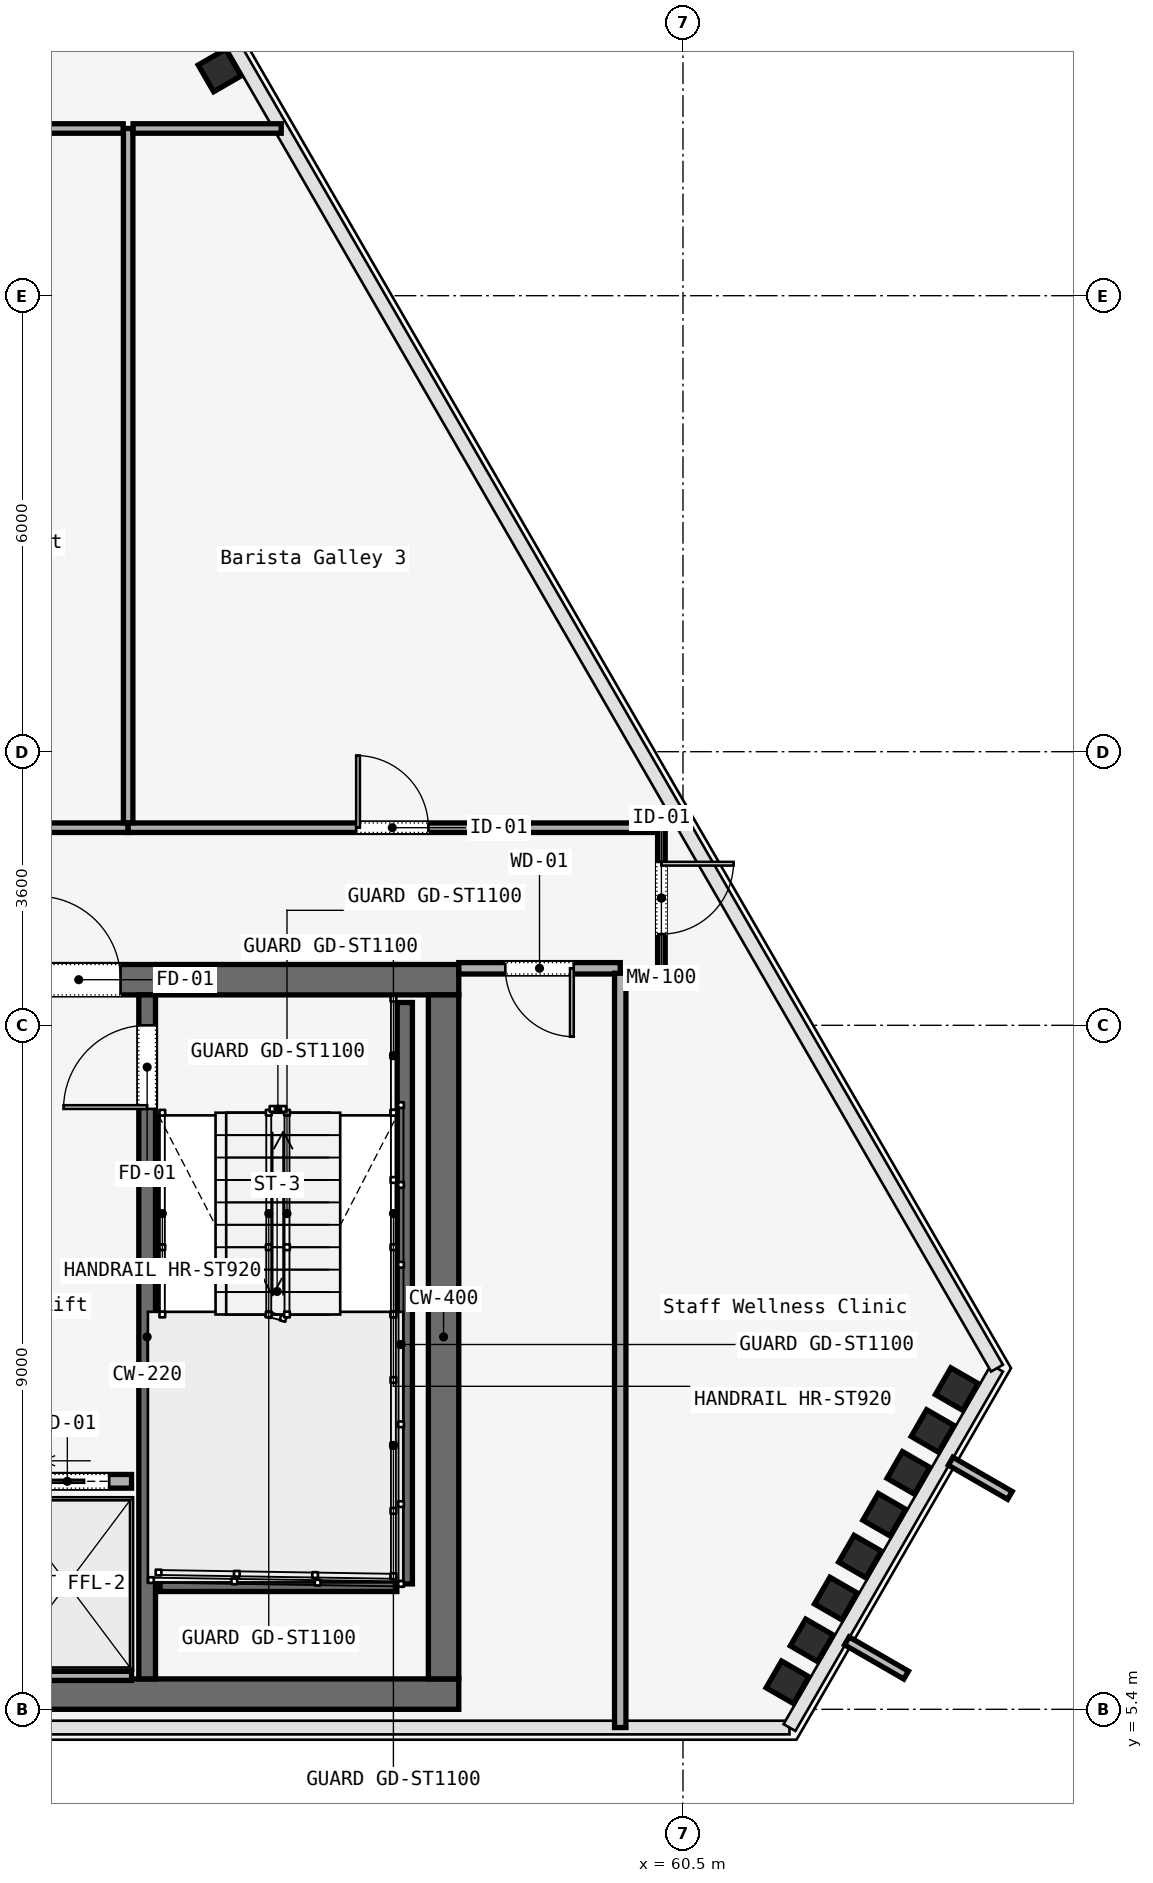
"""IFC4 building model, lengths in metres.
Left out: names, types, materials, properties, quantities, classifications, styles, units other than length and angle.
Written with IfcOpenShell. Run it as: python <this file> out.ifc"""

import sys

from ifc_helpers import new_model, si_unit, direction, frame, frame_2d, origin, origin_2d, place, context, subcontext, project, spatial, rectangle, i_section, extrude, element, fill, save


model = new_model("IFC4")
c1 = context("Model", 3, precision=1e-05, world=origin(), true_north=direction((0.0, 1.0)))
c2 = subcontext(c1, "Body", "Model", "MODEL_VIEW")
j1 = project(units=[si_unit("LENGTHUNIT", "METRE"), si_unit("PLANEANGLEUNIT", "RADIAN")], contexts=[c1])
p1 = place(None, origin())
s1 = spatial("IfcSite", under=j1, at=p1, CompositionType="ELEMENT")
p2 = place(p1, origin())
s2 = spatial("IfcBuilding", under=s1, at=p2, CompositionType="ELEMENT")
p3 = place(p2, frame((0.0, 0.0, 263.6)))
s3 = spatial("IfcBuildingStorey", under=s2, at=p3, CompositionType="ELEMENT", Elevation=263.6)
p4 = place(p3, frame((26.45, 15.0, 0.0), z_axis=(0.0, 0.0, 1.0), x_axis=(1.0, 0.0, 0.0)))
e1 = element("IfcWall", 1, at=p4, inside=s3, PredefinedType="SOLIDWALL", context=c2, shape_type="SweptSolid", body=[
    extrude(rectangle(XDim=31.1, YDim=0.4, at=frame_2d((15.55, 0.0))), origin(), (0.0, 0.0, 1.0), 3.58),
])
p5 = place(p4, frame((1.65, 0.0, 0.0)))
e2 = element("IfcOpeningElement", 2, at=p5, cuts=e1, PredefinedType="OPENING", context=c2, shape_type="SweptSolid", body=[
    extrude(rectangle(XDim=1.1, YDim=2.2, at=frame_2d((0.55, 1.1))), frame((0.0, 0.2, 0.0), z_axis=(0.0, -1.0, 0.0), x_axis=(1.0, 0.0, 0.0)), (0.0, 0.0, 1.0), 0.4),
])
p6 = place(p4, frame((13.65, 0.0, 0.0)))
e3 = element("IfcOpeningElement", 3, at=p6, cuts=e1, PredefinedType="OPENING", context=c2, shape_type="SweptSolid", body=[
    extrude(rectangle(XDim=1.1, YDim=2.2, at=frame_2d((0.55, 1.1))), frame((0.0, 0.2, 0.0), z_axis=(0.0, -1.0, 0.0), x_axis=(1.0, 0.0, 0.0)), (0.0, 0.0, 1.0), 0.4),
])
p7 = place(p4, frame((25.55, 0.0, 0.0)))
e4 = element("IfcOpeningElement", 4, at=p7, cuts=e1, PredefinedType="OPENING", context=c2, shape_type="SweptSolid", body=[
    extrude(rectangle(XDim=1.1, YDim=2.2, at=frame_2d((0.55, 1.1))), frame((0.0, 0.2, 0.0), z_axis=(0.0, -1.0, 0.0), x_axis=(1.0, 0.0, 0.0)), (0.0, 0.0, 1.0), 0.4),
])
p8 = place(p4, frame((19.35, 0.0, 0.0)))
e5 = element("IfcOpeningElement", 5, at=p8, cuts=e1, PredefinedType="OPENING", context=c2, shape_type="SweptSolid", body=[
    extrude(rectangle(XDim=1.1, YDim=2.2, at=frame_2d((0.55, 1.1))), frame((0.0, 0.2, 0.0), z_axis=(0.0, -1.0, 0.0), x_axis=(1.0, 0.0, 0.0)), (0.0, 0.0, 1.0), 0.4),
])
p9 = place(p4, frame((21.4, 0.0, 0.0)))
e6 = element("IfcOpeningElement", 6, at=p9, cuts=e1, PredefinedType="OPENING", context=c2, shape_type="SweptSolid", body=[
    extrude(rectangle(XDim=0.9, YDim=2.1, at=frame_2d((0.45, 1.05))), frame((0.0, 0.2, 0.0), z_axis=(0.0, -1.0, 0.0), x_axis=(1.0, 0.0, 0.0)), (0.0, 0.0, 1.0), 0.4),
])
p10 = place(p4, frame((5.14, 0.0, 0.0)))
e7 = element("IfcOpeningElement", 7, at=p10, cuts=e1, PredefinedType="OPENING", context=c2, shape_type="SweptSolid", body=[
    extrude(rectangle(XDim=0.95, YDim=2.2, at=frame_2d((0.475, 1.1))), frame((0.0, 0.2, 0.0), z_axis=(0.0, -1.0, 0.0), x_axis=(1.0, 0.0, 0.0)), (0.0, 0.0, 1.0), 0.4),
])
p11 = place(p4, frame((7.825, 0.0, 0.0)))
e8 = element("IfcOpeningElement", 8, at=p11, cuts=e1, PredefinedType="OPENING", context=c2, shape_type="SweptSolid", body=[
    extrude(rectangle(XDim=0.95, YDim=2.2, at=frame_2d((0.475, 1.1))), frame((0.0, 0.2, 0.0), z_axis=(0.0, -1.0, 0.0), x_axis=(1.0, 0.0, 0.0)), (0.0, 0.0, 1.0), 0.4),
])
p12 = place(p4, frame((10.46, 0.0, 0.0)))
e9 = element("IfcOpeningElement", 9, at=p12, cuts=e1, PredefinedType="OPENING", context=c2, shape_type="SweptSolid", body=[
    extrude(rectangle(XDim=0.95, YDim=2.2, at=frame_2d((0.475, 1.1))), frame((0.0, 0.2, 0.0), z_axis=(0.0, -1.0, 0.0), x_axis=(1.0, 0.0, 0.0)), (0.0, 0.0, 1.0), 0.4),
])
p13 = place(p4, frame((23.35, 0.0, 0.0)))
e10 = element("IfcOpeningElement", 10, at=p13, cuts=e1, PredefinedType="OPENING", context=c2, shape_type="SweptSolid", body=[
    extrude(rectangle(XDim=1.3, YDim=2.3, at=frame_2d((0.65, 1.15))), frame((0.0, 0.2, 0.0), z_axis=(0.0, -1.0, 0.0), x_axis=(1.0, 0.0, 0.0)), (0.0, 0.0, 1.0), 0.4),
])
p14 = place(p3, frame((26.45, 5.6, 0.0), z_axis=(0.0, 0.0, 1.0), x_axis=(1.0, 0.0, 0.0)))
e11 = element("IfcWall", 11, at=p14, inside=s3, PredefinedType="SOLIDWALL", context=c2, shape_type="SweptSolid", body=[
    extrude(rectangle(XDim=31.1, YDim=0.4, at=frame_2d((15.55, 0.0))), origin(), (0.0, 0.0, 1.0), 3.58),
])
p15 = place(p3, frame((57.35, 5.8, 0.0), z_axis=(0.0, 0.0, 1.0), x_axis=(0.0, 1.0, 0.0)))
e12 = element("IfcWall", 12, at=p15, inside=s3, PredefinedType="SOLIDWALL", context=c2, shape_type="SweptSolid", body=[
    extrude(rectangle(XDim=9.0, YDim=0.4, at=frame_2d((4.5, 0.0))), origin(), (0.0, 0.0, 1.0), 3.58),
])
p16 = place(p3, frame((53.45, 5.8, 0.0), z_axis=(0.0, 0.0, 1.0), x_axis=(0.0, 1.0, 0.0)))
e13 = element("IfcWall", 13, at=p16, inside=s3, PredefinedType="SOLIDWALL", context=c2, shape_type="SweptSolid", body=[
    extrude(rectangle(XDim=9.0, YDim=0.22, at=frame_2d((4.5, 0.0))), origin(), (0.0, 0.0, 1.0), 3.58),
])
p17 = place(p16, frame((7.5, 0.0, 0.0)))
e14 = element("IfcOpeningElement", 14, at=p17, cuts=e13, PredefinedType="OPENING", context=c2, shape_type="SweptSolid", body=[
    extrude(rectangle(XDim=1.1, YDim=2.2, at=frame_2d((0.55, 1.1))), frame((0.0, 0.11, 0.0), z_axis=(0.0, -1.0, 0.0), x_axis=(1.0, 0.0, 0.0)), (0.0, 0.0, 1.0), 0.22),
])
for number, where, z_axis, x_axis in (
    (15, (61.875, 5.756, 0.0), (0.0, 0.0, 1.0), (0.5, 0.866, 0.0)),
    (16, (62.194, 6.307, 0.0), (0.0, 0.0, 1.0), (0.5, 0.866, 0.0)),
    (17, (62.512, 6.858, 0.0), (0.0, 0.0, 1.0), (0.5, 0.866, 0.0)),
    (18, (62.83, 7.409, 0.0), (0.0, 0.0, 1.0), (0.5, 0.866, 0.0)),
    (19, (63.148, 7.96, 0.0), (0.0, 0.0, 1.0), (0.5, 0.866, 0.0)),
    (20, (63.466, 8.511, 0.0), (0.0, 0.0, 1.0), (0.5, 0.866, 0.0)),
    (21, (63.784, 9.062, 0.0), (0.0, 0.0, 1.0), (0.5, 0.866, 0.0)),
    (22, (64.103, 9.613, 0.0), (0.0, 0.0, 1.0), (0.5, 0.866, 0.0)),
    (23, (54.404, 26.964, 0.0), (0.0, 0.0, 1.0), (-0.5, 0.866, 0.0)),
):
    element("IfcColumn", number, at=place(p3, frame(where, z_axis=z_axis, x_axis=x_axis)), inside=s3, PredefinedType="COLUMN", context=c2, shape_type="SweptSolid", body=[
        extrude(i_section(OverallWidth=0.406, OverallDepth=0.416, WebThickness=0.03, FlangeThickness=0.037, FilletRadius=0.015, at=origin_2d()), origin(), (0.0, 0.0, 1.0), 3.58),
    ])
p18 = place(p3, frame((56.84, 14.7, 0.0), z_axis=(0.0, 0.0, 1.0), x_axis=(0.0, -1.0, 0.0)))
e24 = element("IfcWall", 24, at=p18, inside=s3, PredefinedType="SOLIDWALL", context=c2, shape_type="SweptSolid", body=[
    extrude(rectangle(XDim=7.65, YDim=0.2, at=frame_2d((3.825, 0.0))), origin(), (0.0, 0.0, 1.0), 3.8),
])
p19 = place(p3, frame((53.62, 7.05, 0.0), z_axis=(0.0, 0.0, 1.0), x_axis=(1.0, 0.0, 0.0)))
e25 = element("IfcWall", 25, at=p19, inside=s3, PredefinedType="SOLIDWALL", context=c2, shape_type="SweptSolid", body=[
    extrude(rectangle(XDim=3.115, YDim=0.2, at=frame_2d((1.558, 0.0))), origin(), (0.0, 0.0, 1.0), 3.8),
])
p20 = place(p3, frame((51.555, 8.4, 0.0), z_axis=(0.0, 0.0, 1.0), x_axis=(1.0, 0.0, 0.0)))
e26 = element("IfcWall", 26, at=p20, inside=s3, PredefinedType="SOLIDWALL", context=c2, shape_type="SweptSolid", body=[
    extrude(rectangle(XDim=1.69, YDim=0.18, at=frame_2d((0.845, 0.0))), origin(), (0.0, 0.0, 1.0), 3.01),
])
p21 = place(p20, frame((0.295, 0.0, 0.0)))
e27 = element("IfcOpeningElement", 27, at=p21, cuts=e26, PredefinedType="OPENING", context=c2, shape_type="SweptSolid", body=[
    extrude(rectangle(XDim=1.1, YDim=2.2, at=frame_2d((0.55, 1.1))), frame((0.0, 0.09, 0.0), z_axis=(0.0, -1.0, 0.0), x_axis=(1.0, 0.0, 0.0)), (0.0, 0.0, 1.0), 0.18),
])
p22 = place(p3, frame((51.555, 5.84, 0.0), z_axis=(0.0, 0.0, 1.0), x_axis=(1.0, 0.0, 0.0)))
e28 = element("IfcWall", 28, at=p22, inside=s3, PredefinedType="SOLIDWALL", context=c2, shape_type="SweptSolid", body=[
    extrude(rectangle(XDim=1.69, YDim=0.12, at=frame_2d((0.845, 0.0))), origin(), (0.0, 0.0, 1.0), 3.01),
])
p23 = place(p3, frame((60.216, 17.0, 0.0), z_axis=(0.0, 0.0, 1.0), x_axis=(0.0, -1.0, 0.0)))
e29 = element("IfcWall", 29, at=p23, inside=s3, PredefinedType="MOVABLE", context=c2, shape_type="SweptSolid", body=[
    extrude(rectangle(XDim=1.85, YDim=0.1, at=frame_2d((0.925, 0.0))), origin(), (0.0, 0.0, 1.0), 3.01),
])
p24 = place(p23, frame((0.45, 0.0, 0.0)))
e30 = element("IfcOpeningElement", 30, at=p24, cuts=e29, PredefinedType="OPENING", context=c2, shape_type="SweptSolid", body=[
    extrude(rectangle(XDim=0.95, YDim=2.2, at=frame_2d((0.475, 1.1))), frame((0.0, 0.05, 0.0), z_axis=(0.0, -1.0, 0.0), x_axis=(1.0, 0.0, 0.0)), (0.0, 0.0, 1.0), 0.1),
])
p25 = place(p3, frame((59.674, 15.15, 0.0), z_axis=(0.0, 0.0, 1.0), x_axis=(-1.0, 0.0, 0.0)))
e31 = element("IfcWall", 31, at=p25, inside=s3, PredefinedType="PARTITIONING", context=c2, shape_type="SweptSolid", body=[
    extrude(rectangle(XDim=2.124, YDim=0.15, at=frame_2d((1.062, 0.0))), origin(), (0.0, 0.0, 1.0), 3.01),
])
p26 = place(p25, frame((0.612, 0.0, 0.0)))
e32 = element("IfcOpeningElement", 32, at=p26, cuts=e31, PredefinedType="OPENING", context=c2, shape_type="SweptSolid", body=[
    extrude(rectangle(XDim=0.9, YDim=2.15, at=frame_2d((0.45, 1.075))), frame((0.0, 0.075, 0.0), z_axis=(0.0, -1.0, 0.0), x_axis=(1.0, 0.0, 0.0)), (0.0, 0.0, 1.0), 0.15),
])
p27 = place(p3, frame((48.4, 17.0, 0.0), z_axis=(0.0, 0.0, 1.0), x_axis=(1.0, 0.0, 0.0)))
e33 = element("IfcWall", 33, at=p27, inside=s3, PredefinedType="PARTITIONING", context=c2, shape_type="SweptSolid", body=[
    extrude(rectangle(XDim=4.8, YDim=0.125, at=frame_2d((2.4, 0.0))), origin(), (0.0, 0.0, 1.0), 3.01),
])
p28 = place(p27, frame((1.925, 0.0, 0.0)))
e34 = element("IfcOpeningElement", 34, at=p28, cuts=e33, PredefinedType="OPENING", context=c2, shape_type="SweptSolid", body=[
    extrude(rectangle(XDim=0.95, YDim=2.2, at=frame_2d((0.475, 1.1))), frame((0.0, 0.062, 0.0), z_axis=(0.0, -1.0, 0.0), x_axis=(1.0, 0.0, 0.0)), (0.0, 0.0, 1.0), 0.125),
])
p29 = place(p3, frame((53.2, 17.0, 0.0), z_axis=(0.0, 0.0, 1.0), x_axis=(1.0, 0.0, 0.0)))
e35 = element("IfcWall", 35, at=p29, inside=s3, PredefinedType="PARTITIONING", context=c2, shape_type="SweptSolid", body=[
    extrude(rectangle(XDim=6.951, YDim=0.125, at=frame_2d((3.476, 0.0))), origin(), (0.0, 0.0, 1.0), 3.01),
])
p30 = place(p29, frame((3.0, 0.0, 0.0)))
e36 = element("IfcOpeningElement", 36, at=p30, cuts=e35, PredefinedType="OPENING", context=c2, shape_type="SweptSolid", body=[
    extrude(rectangle(XDim=0.95, YDim=2.2, at=frame_2d((0.475, 1.1))), frame((0.0, 0.062, 0.0), z_axis=(0.0, -1.0, 0.0), x_axis=(1.0, 0.0, 0.0)), (0.0, 0.0, 1.0), 0.125),
])
p31 = place(p3, frame((59.674, 15.085, 0.0), z_axis=(0.0, 0.0, 1.0), x_axis=(0.0, -1.0, 0.0)))
e37 = element("IfcWall", 37, at=p31, inside=s3, PredefinedType="PARTITIONING", context=c2, shape_type="SweptSolid", body=[
    extrude(rectangle(XDim=9.925, YDim=0.15, at=frame_2d((4.962, 0.0))), origin(), (0.0, 0.0, 1.0), 3.01),
])
p32 = place(p3, frame((53.2, 17.065, 0.0), z_axis=(0.0, 0.0, 1.0), x_axis=(0.0, 1.0, 0.0)))
e38 = element("IfcWall", 38, at=p32, inside=s3, PredefinedType="PARTITIONING", context=c2, shape_type="SweptSolid", body=[
    extrude(rectangle(XDim=9.135, YDim=0.125, at=frame_2d((4.567, 0.0))), origin(), (0.0, 0.0, 1.0), 3.01),
])
p33 = place(p3, frame((53.265, 26.2, 0.0), z_axis=(0.0, 0.0, 1.0), x_axis=(1.0, 0.0, 0.0)))
e39 = element("IfcWall", 39, at=p33, inside=s3, PredefinedType="PARTITIONING", context=c2, shape_type="SweptSolid", body=[
    extrude(rectangle(XDim=1.949, YDim=0.125, at=frame_2d((0.975, 0.0))), origin(), (0.0, 0.0, 1.0), 3.01),
])
p34 = place(p3, frame((48.5, 26.2, 0.0), z_axis=(0.0, 0.0, 1.0), x_axis=(1.0, 0.0, 0.0)))
e40 = element("IfcWall", 40, at=p34, inside=s3, PredefinedType="PARTITIONING", context=c2, shape_type="SweptSolid", body=[
    extrude(rectangle(XDim=4.635, YDim=0.125, at=frame_2d((2.317, 0.0))), origin(), (0.0, 0.0, 1.0), 3.01),
])
p35 = place(p7, origin())
e41 = element("IfcDoor", 41, at=p35, inside=s3, OperationType="SINGLE_SWING_RIGHT", PredefinedType="DOOR", context=c2, shape_type="SweptSolid", body=[
    extrude(rectangle(XDim=1.1, YDim=2.2, at=frame_2d((0.55, 1.1))), frame((0.0, 0.025, 0.0), z_axis=(0.0, -1.0, 0.0), x_axis=(1.0, 0.0, 0.0)), (0.0, 0.0, 1.0), 0.05),
])
fill(e4, e41)
p36 = place(p17, origin())
e42 = element("IfcDoor", 42, at=p36, inside=s3, OperationType="SINGLE_SWING_LEFT", PredefinedType="DOOR", context=c2, shape_type="SweptSolid", body=[
    extrude(rectangle(XDim=1.1, YDim=2.2, at=frame_2d((0.55, 1.1))), frame((0.0, 0.025, 0.0), z_axis=(0.0, -1.0, 0.0), x_axis=(1.0, 0.0, 0.0)), (0.0, 0.0, 1.0), 0.05),
])
fill(e14, e42)
p37 = place(p21, origin())
e43 = element("IfcDoor", 43, at=p37, inside=s3, OperationType="SLIDING_TO_LEFT", PredefinedType="DOOR", context=c2, shape_type="SweptSolid", body=[
    extrude(rectangle(XDim=1.1, YDim=2.2, at=frame_2d((0.55, 1.1))), frame((0.0, 0.025, 0.0), z_axis=(0.0, -1.0, 0.0), x_axis=(1.0, 0.0, 0.0)), (0.0, 0.0, 1.0), 0.05),
])
fill(e27, e43)
p38 = place(p26, origin())
e44 = element("IfcDoor", 44, at=p38, inside=s3, OperationType="SINGLE_SWING_LEFT", PredefinedType="DOOR", context=c2, shape_type="SweptSolid", body=[
    extrude(rectangle(XDim=0.9, YDim=2.15, at=frame_2d((0.45, 1.075))), frame((0.0, 0.025, 0.0), z_axis=(0.0, -1.0, 0.0), x_axis=(1.0, 0.0, 0.0)), (0.0, 0.0, 1.0), 0.05),
])
fill(e32, e44)
p39 = place(p24, origin())
e45 = element("IfcDoor", 45, at=p39, inside=s3, OperationType="SINGLE_SWING_LEFT", PredefinedType="DOOR", context=c2, shape_type="SweptSolid", body=[
    extrude(rectangle(XDim=0.95, YDim=2.2, at=frame_2d((0.475, 1.1))), frame((0.0, 0.025, 0.0), z_axis=(0.0, -1.0, 0.0), x_axis=(1.0, 0.0, 0.0)), (0.0, 0.0, 1.0), 0.05),
])
fill(e30, e45)
p40 = place(p30, origin())
e46 = element("IfcDoor", 46, at=p40, inside=s3, OperationType="SINGLE_SWING_RIGHT", PredefinedType="DOOR", context=c2, shape_type="SweptSolid", body=[
    extrude(rectangle(XDim=0.95, YDim=2.2, at=frame_2d((0.475, 1.1))), frame((0.0, 0.025, 0.0), z_axis=(0.0, -1.0, 0.0), x_axis=(1.0, 0.0, 0.0)), (0.0, 0.0, 1.0), 0.05),
])
fill(e36, e46)
save(model, sys.argv[1])
